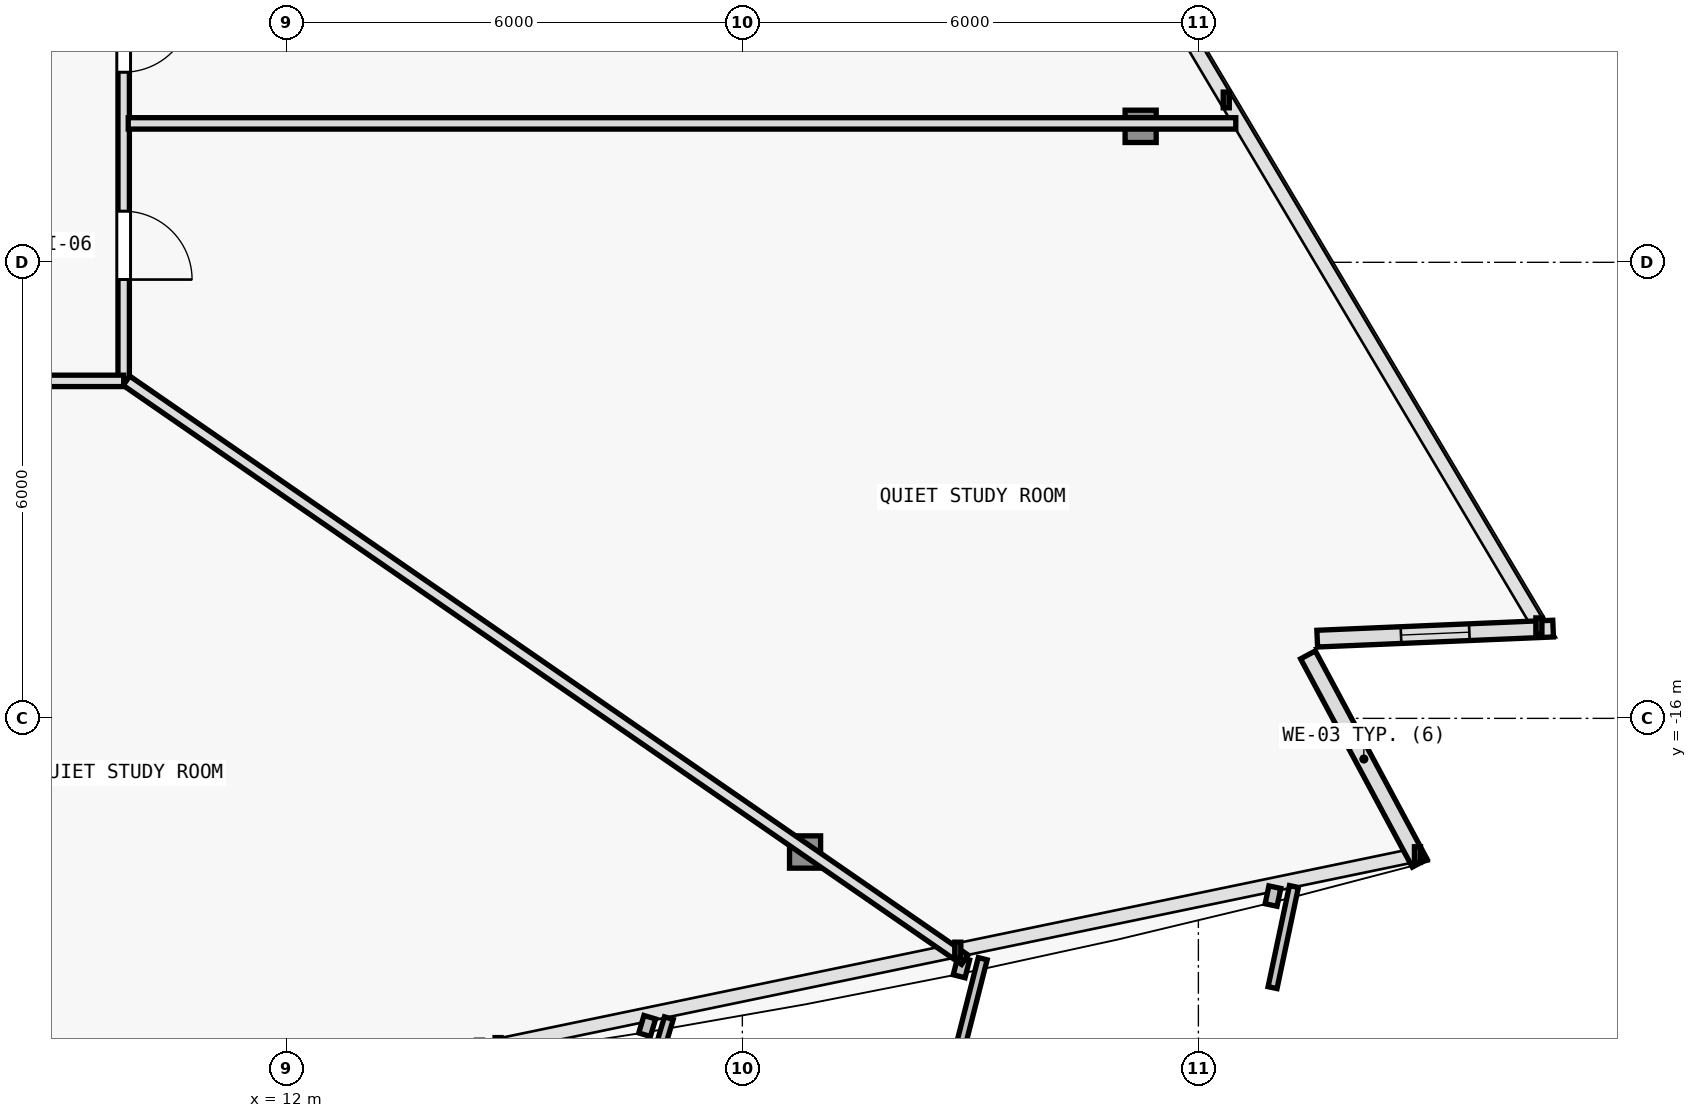
"""IFC4 building model, lengths in metres.
Left out: names, types, materials, properties, quantities, classifications, styles, units other than length and angle.
Written with IfcOpenShell. Run it as: python <this file> out.ifc"""

import sys

from ifc_helpers import new_model, si_unit, direction, frame, frame_2d, origin, origin_2d, place, context, subcontext, project, spatial, rectangle, i_section, extrude, element, fill, save


model = new_model("IFC4")
c1 = context("Model", 3, precision=1e-05, world=origin(), true_north=direction((0.0, 1.0)))
c2 = subcontext(c1, "Body", "Model", "MODEL_VIEW")
j1 = project(units=[si_unit("LENGTHUNIT", "METRE"), si_unit("PLANEANGLEUNIT", "RADIAN")], contexts=[c1])
p1 = place(None, origin())
s1 = spatial("IfcSite", under=j1, at=p1, CompositionType="ELEMENT")
p2 = place(p1, origin())
s2 = spatial("IfcBuilding", under=s1, at=p2, CompositionType="ELEMENT")
p3 = place(p2, frame((0.0, 0.0, 104.1)))
s3 = spatial("IfcBuildingStorey", under=s2, at=p3, CompositionType="ELEMENT", Elevation=104.1)
p4 = place(p3, frame((18.825, -17.758, 0.005), z_axis=(-0.020594893987, 0.033509183946, 0.999226193078), x_axis=(-0.851954850327, -0.523615252838, 0.0)))
e1 = element("IfcColumn", 1, at=p4, inside=s3, PredefinedType="COLUMN", context=c2, shape_type="SweptSolid", body=[
    extrude(i_section(OverallWidth=0.409, OverallDepth=0.425, WebThickness=0.021, FlangeThickness=0.034, FilletRadius=0.015, at=origin_2d()), origin(), (0.0, 0.0, 1.0), 3.592),
])
p5 = place(p3, frame((23.24, -8.211, 0.005), z_axis=(-0.026105701351, 0.021550800334, 0.999426863438), x_axis=(-0.636621915226, -0.771176073964, 0.0)))
e2 = element("IfcColumn", 2, at=p5, inside=s3, PredefinedType="COLUMN", context=c2, shape_type="SweptSolid", body=[
    extrude(i_section(OverallWidth=0.409, OverallDepth=0.425, WebThickness=0.021, FlangeThickness=0.034, FilletRadius=0.015, at=origin_2d()), origin(), (0.0, 0.0, 1.0), 3.591),
])
p6 = place(p3, frame((25.442, -15.165, 0.0), z_axis=(0.0, 0.0, 1.0), x_axis=(0.472811757317, -0.881163459378, 0.0)))
e3 = element("IfcWall", 3, at=p6, inside=s3, PredefinedType="SOLIDWALL", context=c2, shape_type="SweptSolid", body=[
    extrude(rectangle(XDim=3.11, YDim=0.22, at=frame_2d((1.555, 0.0))), origin(), (0.0, 0.0, 1.0), 3.35),
])
p7 = place(p3, frame((28.667, -14.819, 0.0), z_axis=(0.0, 0.0, 1.0), x_axis=(-0.99909228571, -0.042598176436, 0.0)))
e4 = element("IfcWall", 4, at=p7, inside=s3, PredefinedType="SOLIDWALL", context=c2, shape_type="SweptSolid", body=[
    extrude(rectangle(XDim=3.106, YDim=0.22, at=frame_2d((1.553, 0.0))), origin(), (0.0, 0.0, 1.0), 3.35),
])
p8 = place(p7, frame((1.103, 0.0, 0.62)))
e5 = element("IfcOpeningElement", 5, at=p8, cuts=e4, PredefinedType="OPENING", context=c2, shape_type="SweptSolid", body=[
    extrude(rectangle(XDim=0.9, YDim=1.6, at=frame_2d((0.45, 0.8))), frame((0.0, 0.12, 0.0), z_axis=(0.0, -1.0, 0.0), x_axis=(1.0, 0.0, 0.0)), (0.0, 0.0, 1.0), 0.24),
])
p9 = place(p3, frame((9.86, 8.426, 0.0), z_axis=(0.0, 0.0, 1.0), x_axis=(0.0, -1.0, 0.0)))
e6 = element("IfcWall", 6, at=p9, inside=s3, PredefinedType="PARTITIONING", context=c2, shape_type="SweptSolid", body=[
    extrude(rectangle(XDim=19.986, YDim=0.15, at=frame_2d((9.993, 0.0))), origin(), (0.0, 0.0, 1.0), 2.705),
])
p10 = place(p9, frame((17.753, 0.0, 0.0)))
e7 = element("IfcOpeningElement", 7, at=p10, cuts=e6, PredefinedType="OPENING", context=c2, shape_type="SweptSolid", body=[
    extrude(rectangle(XDim=0.9, YDim=2.1, at=frame_2d((0.45, 1.05))), frame((0.0, 0.085, 0.0), z_axis=(0.0, -1.0, 0.0), x_axis=(1.0, 0.0, 0.0)), (0.0, 0.0, 1.0), 0.17),
])
p11 = place(p9, frame((15.024, 0.0, 0.0)))
e8 = element("IfcOpeningElement", 8, at=p11, cuts=e6, PredefinedType="OPENING", context=c2, shape_type="SweptSolid", body=[
    extrude(rectangle(XDim=0.9, YDim=2.1, at=frame_2d((0.45, 1.05))), frame((0.0, 0.085, 0.0), z_axis=(0.0, -1.0, 0.0), x_axis=(1.0, 0.0, 0.0)), (0.0, 0.0, 1.0), 0.17),
])
p12 = place(p9, frame((12.777, 0.0, 0.0)))
e9 = element("IfcOpeningElement", 9, at=p12, cuts=e6, PredefinedType="OPENING", context=c2, shape_type="SweptSolid", body=[
    extrude(rectangle(XDim=0.9, YDim=2.1, at=frame_2d((0.45, 1.05))), frame((0.0, 0.085, 0.0), z_axis=(0.0, -1.0, 0.0), x_axis=(1.0, 0.0, 0.0)), (0.0, 0.0, 1.0), 0.17),
])
p13 = place(p9, frame((9.771, 0.0, 0.0)))
e10 = element("IfcOpeningElement", 10, at=p13, cuts=e6, PredefinedType="OPENING", context=c2, shape_type="SweptSolid", body=[
    extrude(rectangle(XDim=0.9, YDim=2.1, at=frame_2d((0.45, 1.05))), frame((0.0, 0.085, 0.0), z_axis=(0.0, -1.0, 0.0), x_axis=(1.0, 0.0, 0.0)), (0.0, 0.0, 1.0), 0.17),
])
p14 = place(p9, frame((5.825, 0.0, 0.0)))
e11 = element("IfcOpeningElement", 11, at=p14, cuts=e6, PredefinedType="OPENING", context=c2, shape_type="SweptSolid", body=[
    extrude(rectangle(XDim=0.9, YDim=2.1, at=frame_2d((0.45, 1.05))), frame((0.0, 0.085, 0.0), z_axis=(0.0, -1.0, 0.0), x_axis=(1.0, 0.0, 0.0)), (0.0, 0.0, 1.0), 0.17),
])
p15 = place(p9, frame((1.744, 0.0, 0.0)))
e12 = element("IfcOpeningElement", 12, at=p15, cuts=e6, PredefinedType="OPENING", context=c2, shape_type="SweptSolid", body=[
    extrude(rectangle(XDim=0.9, YDim=2.1, at=frame_2d((0.45, 1.05))), frame((0.0, 0.085, 0.0), z_axis=(0.0, -1.0, 0.0), x_axis=(1.0, 0.0, 0.0)), (0.0, 0.0, 1.0), 0.17),
])
p16 = place(p3, frame((9.86, -11.56, 0.0), z_axis=(0.0, 0.0, 1.0), x_axis=(-1.0, 0.0, 0.0)))
e13 = element("IfcWall", 13, at=p16, inside=s3, PredefinedType="PARTITIONING", context=c2, shape_type="SweptSolid", body=[
    extrude(rectangle(XDim=6.78, YDim=0.15, at=frame_2d((3.39, 0.0))), origin(), (0.0, 0.0, 1.0), 2.965),
])
p17 = place(p16, frame((2.94, 0.0, 0.0)))
e14 = element("IfcOpeningElement", 14, at=p17, cuts=e13, PredefinedType="OPENING", context=c2, shape_type="SweptSolid", body=[
    extrude(rectangle(XDim=0.9, YDim=2.1, at=frame_2d((0.45, 1.05))), frame((0.0, 0.085, 0.0), z_axis=(0.0, -1.0, 0.0), x_axis=(1.0, 0.0, 0.0)), (0.0, 0.0, 1.0), 0.17),
])
p18 = place(p3, frame((9.896, -11.558, 0.0), z_axis=(0.0, 0.0, 1.0), x_axis=(0.82286040312, -0.568243571875, 0.0)))
e15 = element("IfcWall", 15, at=p18, inside=s3, PredefinedType="PARTITIONING", context=c2, shape_type="SweptSolid", body=[
    extrude(rectangle(XDim=13.405, YDim=0.15, at=frame_2d((6.702, 0.0))), origin(), (0.0, 0.0, 1.0), 2.775),
])
p19 = place(p3, frame((9.92, -8.173, 0.0), z_axis=(0.0, 0.0, 1.0), x_axis=(1.0, 0.0, 0.0)))
e16 = element("IfcWall", 16, at=p19, inside=s3, PredefinedType="PARTITIONING", context=c2, shape_type="SweptSolid", body=[
    extrude(rectangle(XDim=14.572, YDim=0.15, at=frame_2d((7.286, 0.0))), origin(), (0.0, 0.0, 1.0), 2.705),
])
p20 = place(p8, origin())
e17 = element("IfcWindow", 17, at=p20, inside=s3, PartitioningType="SINGLE_PANEL", PredefinedType="WINDOW", context=c2, shape_type="SweptSolid", body=[
    extrude(rectangle(XDim=0.9, YDim=1.6, at=frame_2d((0.45, 0.8))), frame((0.0, 0.03, 0.0), z_axis=(0.0, -1.0, 0.0), x_axis=(1.0, 0.0, 0.0)), (0.0, 0.0, 1.0), 0.06),
])
fill(e5, e17)
p21 = place(p10, origin())
e18 = element("IfcDoor", 18, at=p21, inside=s3, OperationType="SINGLE_SWING_RIGHT", PredefinedType="DOOR", context=c2, shape_type="SweptSolid", body=[
    extrude(rectangle(XDim=0.9, YDim=2.1, at=frame_2d((0.45, 1.05))), frame((0.0, 0.025, 0.0), z_axis=(0.0, -1.0, 0.0), x_axis=(1.0, 0.0, 0.0)), (0.0, 0.0, 1.0), 0.05),
])
fill(e7, e18)
p22 = place(p11, origin())
e19 = element("IfcDoor", 19, at=p22, inside=s3, OperationType="SINGLE_SWING_LEFT", PredefinedType="DOOR", context=c2, shape_type="SweptSolid", body=[
    extrude(rectangle(XDim=0.9, YDim=2.1, at=frame_2d((0.45, 1.05))), frame((0.0, 0.025, 0.0), z_axis=(0.0, -1.0, 0.0), x_axis=(1.0, 0.0, 0.0)), (0.0, 0.0, 1.0), 0.05),
])
fill(e8, e19)
save(model, sys.argv[1])
